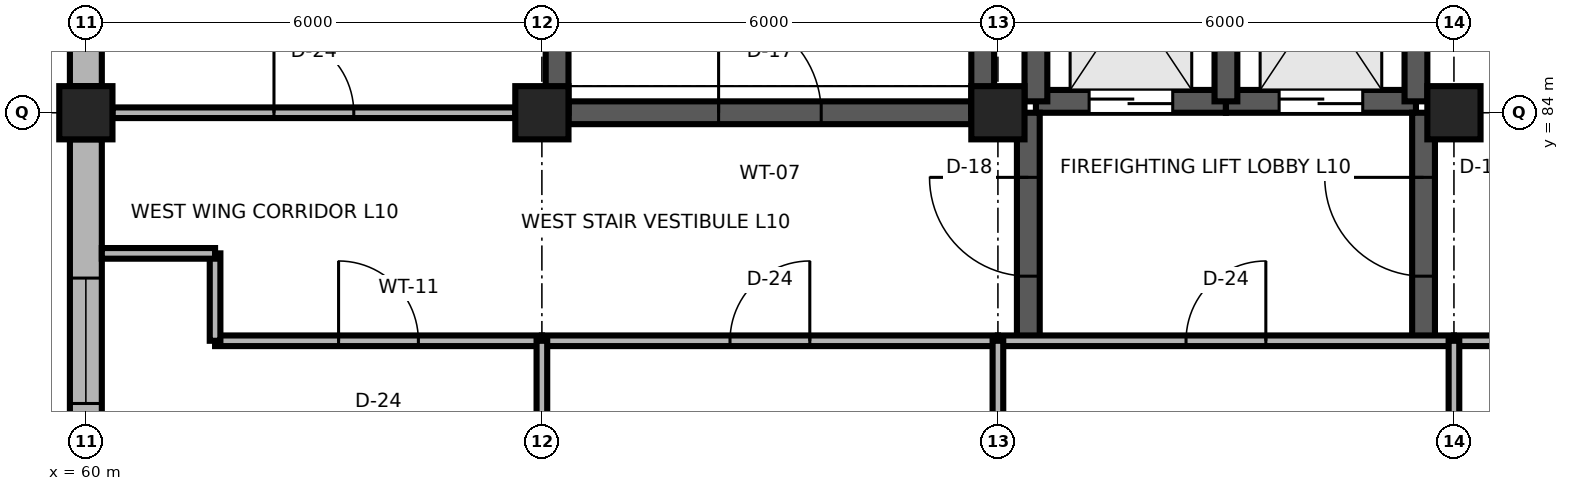
"""IFC4 building model, lengths in metres.
Left out: names, types, materials, properties, quantities, classifications, styles, units other than length and angle.
Written with IfcOpenShell. Run it as: python <this file> out.ifc"""

import sys

from ifc_helpers import new_model, si_unit, direction, frame, frame_2d, origin, origin_2d, place, context, subcontext, project, spatial, rectangle, extrude, element, fill, save


model = new_model("IFC4")
c1 = context("Model", 3, precision=1e-05, world=origin(), true_north=direction((0.0, 1.0)))
c2 = subcontext(c1, "Body", "Model", "MODEL_VIEW")
j1 = project(units=[si_unit("LENGTHUNIT", "METRE"), si_unit("PLANEANGLEUNIT", "RADIAN")], contexts=[c1])
p1 = place(None, origin())
s1 = spatial("IfcSite", under=j1, at=p1, CompositionType="ELEMENT")
p2 = place(p1, origin())
s2 = spatial("IfcBuilding", under=s1, at=p2, CompositionType="ELEMENT")
p3 = place(p2, frame((0.0, 0.0, 40.5)))
s3 = spatial("IfcBuildingStorey", under=s2, at=p3, CompositionType="ELEMENT", Elevation=40.5)
for number, where, z_axis, x_axis in (
    (1, (60.0, 84.0, 0.0), (0.0, 0.0, 1.0), (1.0, 0.0, 0.0)),
    (2, (66.0, 84.0, 0.0), (0.0, 0.0, 1.0), (1.0, 0.0, 0.0)),
    (3, (72.0, 84.0, 0.0), (0.0, 0.0, 1.0), (1.0, 0.0, 0.0)),
    (4, (78.0, 84.0, 0.0), (0.0, 0.0, 1.0), (1.0, 0.0, 0.0)),
):
    element("IfcColumn", number, at=place(p3, frame(where, z_axis=z_axis, x_axis=x_axis)), inside=s3, PredefinedType="COLUMN", context=c2, shape_type="SweptSolid", body=[
        extrude(rectangle(XDim=0.7, YDim=0.7, at=origin_2d()), origin(), (0.0, 0.0, 1.0), 3.9),
    ])
p4 = place(p3, frame((60.0, 78.35, 0.0), z_axis=(0.0, 0.0, 1.0), x_axis=(0.0, 1.0, 0.0)))
e5 = element("IfcWall", 5, at=p4, inside=s3, PredefinedType="SOLIDWALL", context=c2, shape_type="SweptSolid", body=[
    extrude(rectangle(XDim=5.3, YDim=0.42, at=frame_2d((2.65, 0.0))), origin(), (0.0, 0.0, 1.0), 3.32),
])
p5 = place(p4, frame((1.825, 0.0, 0.85)))
e6 = element("IfcOpeningElement", 6, at=p5, cuts=e5, PredefinedType="OPENING", context=c2, shape_type="SweptSolid", body=[
    extrude(rectangle(XDim=1.65, YDim=1.95, at=frame_2d((0.825, 0.975))), frame((0.0, 0.225, 0.0), z_axis=(0.0, -1.0, 0.0), x_axis=(1.0, 0.0, 0.0)), (0.0, 0.0, 1.0), 0.45),
])
p6 = place(p3, frame((60.0, 84.35, 0.0), z_axis=(0.0, 0.0, 1.0), x_axis=(0.0, 1.0, 0.0)))
e7 = element("IfcWall", 7, at=p6, inside=s3, PredefinedType="SOLIDWALL", context=c2, shape_type="SweptSolid", body=[
    extrude(rectangle(XDim=5.3, YDim=0.42, at=frame_2d((2.65, 0.0))), origin(), (0.0, 0.0, 1.0), 3.32),
])
p7 = place(p6, frame((1.825, 0.0, 0.85)))
e8 = element("IfcOpeningElement", 8, at=p7, cuts=e7, PredefinedType="OPENING", context=c2, shape_type="SweptSolid", body=[
    extrude(rectangle(XDim=1.65, YDim=1.95, at=frame_2d((0.825, 0.975))), frame((0.0, 0.225, 0.0), z_axis=(0.0, -1.0, 0.0), x_axis=(1.0, 0.0, 0.0)), (0.0, 0.0, 1.0), 0.45),
])
p8 = place(p3, frame((66.35, 84.0, 0.0), z_axis=(0.0, 0.0, 1.0), x_axis=(1.0, 0.0, 0.0)))
e9 = element("IfcWall", 9, at=p8, inside=s3, PredefinedType="SHEAR", context=c2, shape_type="SweptSolid", body=[
    extrude(rectangle(XDim=5.3, YDim=0.3, at=frame_2d((2.65, 0.0))), origin(), (0.0, 0.0, 1.0), 3.66),
])
p9 = place(p8, frame((1.975, 0.0, 0.0)))
e10 = element("IfcOpeningElement", 10, at=p9, cuts=e9, PredefinedType="OPENING", context=c2, shape_type="SweptSolid", body=[
    extrude(rectangle(XDim=1.35, YDim=2.2, at=frame_2d((0.675, 1.1))), frame((0.0, 0.165, 0.0), z_axis=(0.0, -1.0, 0.0), x_axis=(1.0, 0.0, 0.0)), (0.0, 0.0, 1.0), 0.33),
])
for number, where, z_axis, x_axis in (
    (11, (66.2, 84.0, 0.0), (0.0, 0.0, 1.0), (0.0, 1.0, 0.0)),
    (12, (71.8, 84.0, 0.0), (0.0, 0.0, 1.0), (0.0, 1.0, 0.0)),
):
    element("IfcWall", number, at=place(p3, frame(where, z_axis=z_axis, x_axis=x_axis)), inside=s3, PredefinedType="SHEAR", context=c2, shape_type="SweptSolid", body=[
        extrude(rectangle(XDim=11.8, YDim=0.3, at=frame_2d((5.9, 0.0))), origin(), (0.0, 0.0, 1.0), 3.74),
    ])
p10 = place(p3, frame((72.5, 84.15, 0.0), z_axis=(0.0, 0.0, 1.0), x_axis=(1.0, 0.0, 0.0)))
e13 = element("IfcWall", 13, at=p10, inside=s3, PredefinedType="SHEAR", context=c2, shape_type="SweptSolid", body=[
    extrude(rectangle(XDim=2.5, YDim=0.3, at=frame_2d((1.25, 0.0))), origin(), (0.0, 0.0, 1.0), 3.74),
])
p11 = place(p10, frame((0.7, 0.0, 0.0)))
e14 = element("IfcOpeningElement", 14, at=p11, cuts=e13, PredefinedType="OPENING", context=c2, shape_type="SweptSolid", body=[
    extrude(rectangle(XDim=1.1, YDim=2.1, at=frame_2d((0.55, 1.05))), frame((0.0, 0.165, 0.0), z_axis=(0.0, -1.0, 0.0), x_axis=(1.0, 0.0, 0.0)), (0.0, 0.0, 1.0), 0.33),
])
p12 = place(p3, frame((72.5, 84.15, 0.0), z_axis=(0.0, 0.0, 1.0), x_axis=(0.0, 1.0, 0.0)))
e15 = element("IfcWall", 15, at=p12, inside=s3, PredefinedType="SHEAR", context=c2, shape_type="SweptSolid", body=[
    extrude(rectangle(XDim=3.4, YDim=0.3, at=frame_2d((1.7, 0.0))), origin(), (0.0, 0.0, 1.0), 3.74),
])
p13 = place(p3, frame((75.0, 84.15, 0.0), z_axis=(0.0, 0.0, 1.0), x_axis=(1.0, 0.0, 0.0)))
e16 = element("IfcWall", 16, at=p13, inside=s3, PredefinedType="SHEAR", context=c2, shape_type="SweptSolid", body=[
    extrude(rectangle(XDim=2.5, YDim=0.3, at=frame_2d((1.25, 0.0))), origin(), (0.0, 0.0, 1.0), 3.74),
])
p14 = place(p13, frame((0.7, 0.0, 0.0)))
e17 = element("IfcOpeningElement", 17, at=p14, cuts=e16, PredefinedType="OPENING", context=c2, shape_type="SweptSolid", body=[
    extrude(rectangle(XDim=1.1, YDim=2.1, at=frame_2d((0.55, 1.05))), frame((0.0, 0.165, 0.0), z_axis=(0.0, -1.0, 0.0), x_axis=(1.0, 0.0, 0.0)), (0.0, 0.0, 1.0), 0.33),
])
for number, where, z_axis, x_axis in (
    (18, (75.0, 84.15, 0.0), (0.0, 0.0, 1.0), (0.0, 1.0, 0.0)),
    (19, (77.5, 84.15, 0.0), (0.0, 0.0, 1.0), (0.0, 1.0, 0.0)),
):
    element("IfcWall", number, at=place(p3, frame(where, z_axis=z_axis, x_axis=x_axis)), inside=s3, PredefinedType="SHEAR", context=c2, shape_type="SweptSolid", body=[
        extrude(rectangle(XDim=3.4, YDim=0.3, at=frame_2d((1.7, 0.0))), origin(), (0.0, 0.0, 1.0), 3.74),
    ])
p15 = place(p3, frame((72.4, 81.0, 0.0), z_axis=(0.0, 0.0, 1.0), x_axis=(0.0, 1.0, 0.0)))
e20 = element("IfcWall", 20, at=p15, inside=s3, PredefinedType="SHEAR", context=c2, shape_type="SweptSolid", body=[
    extrude(rectangle(XDim=3.0, YDim=0.3, at=frame_2d((1.5, 0.0))), origin(), (0.0, 0.0, 1.0), 3.74),
])
p16 = place(p15, frame((0.85, 0.0, 0.0)))
e21 = element("IfcOpeningElement", 21, at=p16, cuts=e20, PredefinedType="OPENING", context=c2, shape_type="SweptSolid", body=[
    extrude(rectangle(XDim=1.3, YDim=2.2, at=frame_2d((0.65, 1.1))), frame((0.0, 0.165, 0.0), z_axis=(0.0, -1.0, 0.0), x_axis=(1.0, 0.0, 0.0)), (0.0, 0.0, 1.0), 0.33),
])
p17 = place(p3, frame((77.6, 81.0, 0.0), z_axis=(0.0, 0.0, 1.0), x_axis=(0.0, 1.0, 0.0)))
e22 = element("IfcWall", 22, at=p17, inside=s3, PredefinedType="SHEAR", context=c2, shape_type="SweptSolid", body=[
    extrude(rectangle(XDim=3.0, YDim=0.3, at=frame_2d((1.5, 0.0))), origin(), (0.0, 0.0, 1.0), 3.74),
])
p18 = place(p17, frame((0.85, 0.0, 0.0)))
e23 = element("IfcOpeningElement", 23, at=p18, cuts=e22, PredefinedType="OPENING", context=c2, shape_type="SweptSolid", body=[
    extrude(rectangle(XDim=1.3, YDim=2.2, at=frame_2d((0.65, 1.1))), frame((0.0, 0.165, 0.0), z_axis=(0.0, -1.0, 0.0), x_axis=(1.0, 0.0, 0.0)), (0.0, 0.0, 1.0), 0.33),
])
p19 = place(p3, frame((61.7, 81.0, 0.0), z_axis=(0.0, 0.0, 1.0), x_axis=(1.0, 0.0, 0.0)))
e24 = element("IfcWall", 24, at=p19, inside=s3, PredefinedType="PARTITIONING", context=c2, shape_type="SweptSolid", body=[
    extrude(rectangle(XDim=4.3, YDim=0.14, at=frame_2d((2.15, 0.0))), origin(), (0.0, 0.0, 1.0), 3.74),
])
p20 = place(p19, frame((1.625, 0.0, 0.0)))
e25 = element("IfcOpeningElement", 25, at=p20, cuts=e24, PredefinedType="OPENING", context=c2, shape_type="SweptSolid", body=[
    extrude(rectangle(XDim=1.05, YDim=2.25, at=frame_2d((0.525, 1.125))), frame((0.0, 0.085, 0.0), z_axis=(0.0, -1.0, 0.0), x_axis=(1.0, 0.0, 0.0)), (0.0, 0.0, 1.0), 0.17),
])
p21 = place(p3, frame((66.0, 81.0, 0.0), z_axis=(0.0, 0.0, 1.0), x_axis=(1.0, 0.0, 0.0)))
e26 = element("IfcWall", 26, at=p21, inside=s3, PredefinedType="PARTITIONING", context=c2, shape_type="SweptSolid", body=[
    extrude(rectangle(XDim=6.0, YDim=0.14, at=frame_2d((3.0, 0.0))), origin(), (0.0, 0.0, 1.0), 3.74),
])
p22 = place(p21, frame((2.475, 0.0, 0.0)))
e27 = element("IfcOpeningElement", 27, at=p22, cuts=e26, PredefinedType="OPENING", context=c2, shape_type="SweptSolid", body=[
    extrude(rectangle(XDim=1.05, YDim=2.25, at=frame_2d((0.525, 1.125))), frame((0.0, 0.085, 0.0), z_axis=(0.0, -1.0, 0.0), x_axis=(1.0, 0.0, 0.0)), (0.0, 0.0, 1.0), 0.17),
])
p23 = place(p3, frame((72.0, 81.0, 0.0), z_axis=(0.0, 0.0, 1.0), x_axis=(1.0, 0.0, 0.0)))
e28 = element("IfcWall", 28, at=p23, inside=s3, PredefinedType="PARTITIONING", context=c2, shape_type="SweptSolid", body=[
    extrude(rectangle(XDim=6.0, YDim=0.14, at=frame_2d((3.0, 0.0))), origin(), (0.0, 0.0, 1.0), 3.74),
])
p24 = place(p23, frame((2.475, 0.0, 0.0)))
e29 = element("IfcOpeningElement", 29, at=p24, cuts=e28, PredefinedType="OPENING", context=c2, shape_type="SweptSolid", body=[
    extrude(rectangle(XDim=1.05, YDim=2.25, at=frame_2d((0.525, 1.125))), frame((0.0, 0.085, 0.0), z_axis=(0.0, -1.0, 0.0), x_axis=(1.0, 0.0, 0.0)), (0.0, 0.0, 1.0), 0.17),
])
p25 = place(p3, frame((78.0, 81.0, 0.0), z_axis=(0.0, 0.0, 1.0), x_axis=(1.0, 0.0, 0.0)))
e30 = element("IfcWall", 30, at=p25, inside=s3, PredefinedType="PARTITIONING", context=c2, shape_type="SweptSolid", body=[
    extrude(rectangle(XDim=6.0, YDim=0.14, at=frame_2d((3.0, 0.0))), origin(), (0.0, 0.0, 1.0), 3.74),
])
p26 = place(p25, frame((2.475, 0.0, 0.0)))
e31 = element("IfcOpeningElement", 31, at=p26, cuts=e30, PredefinedType="OPENING", context=c2, shape_type="SweptSolid", body=[
    extrude(rectangle(XDim=1.05, YDim=2.25, at=frame_2d((0.525, 1.125))), frame((0.0, 0.085, 0.0), z_axis=(0.0, -1.0, 0.0), x_axis=(1.0, 0.0, 0.0)), (0.0, 0.0, 1.0), 0.17),
])
p27 = place(p3, frame((60.35, 84.0, 0.0), z_axis=(0.0, 0.0, 1.0), x_axis=(1.0, 0.0, 0.0)))
e32 = element("IfcWall", 32, at=p27, inside=s3, PredefinedType="PARTITIONING", context=c2, shape_type="SweptSolid", body=[
    extrude(rectangle(XDim=5.3, YDim=0.14, at=frame_2d((2.65, 0.0))), origin(), (0.0, 0.0, 1.0), 3.348),
])
p28 = place(p27, frame((2.125, 0.0, 0.0)))
e33 = element("IfcOpeningElement", 33, at=p28, cuts=e32, PredefinedType="OPENING", context=c2, shape_type="SweptSolid", body=[
    extrude(rectangle(XDim=1.05, YDim=2.25, at=frame_2d((0.525, 1.125))), frame((0.0, 0.085, 0.0), z_axis=(0.0, -1.0, 0.0), x_axis=(1.0, 0.0, 0.0)), (0.0, 0.0, 1.0), 0.17),
])
for number, where, z_axis, x_axis in (
    (34, (66.0, 72.65, 0.0), (0.0, 0.0, 1.0), (0.0, 1.0, 0.0)),
    (35, (72.0, 72.65, 0.0), (0.0, 0.0, 1.0), (0.0, 1.0, 0.0)),
    (36, (78.0, 72.65, 0.0), (0.0, 0.0, 1.0), (0.0, 1.0, 0.0)),
):
    element("IfcWall", number, at=place(p3, frame(where, z_axis=z_axis, x_axis=x_axis)), inside=s3, PredefinedType="PARTITIONING", context=c2, shape_type="SweptSolid", body=[
        extrude(rectangle(XDim=8.35, YDim=0.14, at=frame_2d((4.175, 0.0))), origin(), (0.0, 0.0, 1.0), 3.348),
    ])
p29 = place(p3, frame((61.7, 81.0, 0.0), z_axis=(0.0, 0.0, 1.0), x_axis=(0.0, 1.0, 0.0)))
e37 = element("IfcWall", 37, at=p29, inside=s3, PredefinedType="PARTITIONING", context=c2, shape_type="SweptSolid", body=[
    extrude(rectangle(XDim=1.15, YDim=0.14, at=frame_2d((0.575, 0.0))), origin(), (0.0, 0.0, 1.0), 3.74),
])
p30 = place(p3, frame((61.7, 82.15, 0.0), z_axis=(0.0, 0.0, 1.0), x_axis=(-1.0, 0.0, 0.0)))
e38 = element("IfcWall", 38, at=p30, inside=s3, PredefinedType="PARTITIONING", context=c2, shape_type="SweptSolid", body=[
    extrude(rectangle(XDim=1.49, YDim=0.14, at=frame_2d((0.745, 0.0))), origin(), (0.0, 0.0, 1.0), 3.74),
])
p31 = place(p5, origin())
e39 = element("IfcWindow", 39, at=p31, inside=s3, PartitioningType="SINGLE_PANEL", PredefinedType="WINDOW", context=c2, shape_type="SweptSolid", body=[
    extrude(rectangle(XDim=1.65, YDim=1.95, at=frame_2d((0.825, 0.975))), frame((0.0, 0.03, 0.0), z_axis=(0.0, -1.0, 0.0), x_axis=(1.0, 0.0, 0.0)), (0.0, 0.0, 1.0), 0.06),
])
fill(e6, e39)
p32 = place(p9, origin())
e40 = element("IfcDoor", 40, at=p32, inside=s3, OperationType="SINGLE_SWING_LEFT", PredefinedType="DOOR", context=c2, shape_type="SweptSolid", body=[
    extrude(rectangle(XDim=1.35, YDim=2.2, at=frame_2d((0.675, 1.1))), frame((0.0, 0.025, 0.0), z_axis=(0.0, -1.0, 0.0), x_axis=(1.0, 0.0, 0.0)), (0.0, 0.0, 1.0), 0.05),
])
fill(e10, e40)
p33 = place(p11, origin())
e41 = element("IfcDoor", 41, at=p33, inside=s3, OperationType="DOUBLE_DOOR_SLIDING", PredefinedType="DOOR", context=c2, shape_type="SweptSolid", body=[
    extrude(rectangle(XDim=1.1, YDim=2.1, at=frame_2d((0.55, 1.05))), frame((0.0, 0.025, 0.0), z_axis=(0.0, -1.0, 0.0), x_axis=(1.0, 0.0, 0.0)), (0.0, 0.0, 1.0), 0.05),
])
fill(e14, e41)
p34 = place(p14, origin())
e42 = element("IfcDoor", 42, at=p34, inside=s3, OperationType="DOUBLE_DOOR_SLIDING", PredefinedType="DOOR", context=c2, shape_type="SweptSolid", body=[
    extrude(rectangle(XDim=1.1, YDim=2.1, at=frame_2d((0.55, 1.05))), frame((0.0, 0.025, 0.0), z_axis=(0.0, -1.0, 0.0), x_axis=(1.0, 0.0, 0.0)), (0.0, 0.0, 1.0), 0.05),
])
fill(e17, e42)
p35 = place(p16, origin())
e43 = element("IfcDoor", 43, at=p35, inside=s3, OperationType="SINGLE_SWING_RIGHT", PredefinedType="DOOR", context=c2, shape_type="SweptSolid", body=[
    extrude(rectangle(XDim=1.3, YDim=2.2, at=frame_2d((0.65, 1.1))), frame((0.0, 0.025, 0.0), z_axis=(0.0, -1.0, 0.0), x_axis=(1.0, 0.0, 0.0)), (0.0, 0.0, 1.0), 0.05),
])
fill(e21, e43)
p36 = place(p18, origin())
e44 = element("IfcDoor", 44, at=p36, inside=s3, OperationType="SINGLE_SWING_RIGHT", PredefinedType="DOOR", context=c2, shape_type="SweptSolid", body=[
    extrude(rectangle(XDim=1.3, YDim=2.2, at=frame_2d((0.65, 1.1))), frame((0.0, 0.025, 0.0), z_axis=(0.0, -1.0, 0.0), x_axis=(1.0, 0.0, 0.0)), (0.0, 0.0, 1.0), 0.05),
])
fill(e23, e44)
p37 = place(p20, origin())
e45 = element("IfcDoor", 45, at=p37, inside=s3, OperationType="SINGLE_SWING_LEFT", PredefinedType="DOOR", context=c2, shape_type="SweptSolid", body=[
    extrude(rectangle(XDim=1.05, YDim=2.25, at=frame_2d((0.525, 1.125))), frame((0.0, 0.025, 0.0), z_axis=(0.0, -1.0, 0.0), x_axis=(1.0, 0.0, 0.0)), (0.0, 0.0, 1.0), 0.05),
])
fill(e25, e45)
p38 = place(p22, origin())
e46 = element("IfcDoor", 46, at=p38, inside=s3, OperationType="SINGLE_SWING_RIGHT", PredefinedType="DOOR", context=c2, shape_type="SweptSolid", body=[
    extrude(rectangle(XDim=1.05, YDim=2.25, at=frame_2d((0.525, 1.125))), frame((0.0, 0.025, 0.0), z_axis=(0.0, -1.0, 0.0), x_axis=(1.0, 0.0, 0.0)), (0.0, 0.0, 1.0), 0.05),
])
fill(e27, e46)
p39 = place(p24, origin())
e47 = element("IfcDoor", 47, at=p39, inside=s3, OperationType="SINGLE_SWING_RIGHT", PredefinedType="DOOR", context=c2, shape_type="SweptSolid", body=[
    extrude(rectangle(XDim=1.05, YDim=2.25, at=frame_2d((0.525, 1.125))), frame((0.0, 0.025, 0.0), z_axis=(0.0, -1.0, 0.0), x_axis=(1.0, 0.0, 0.0)), (0.0, 0.0, 1.0), 0.05),
])
fill(e29, e47)
p40 = place(p28, origin())
e48 = element("IfcDoor", 48, at=p40, inside=s3, OperationType="SINGLE_SWING_LEFT", PredefinedType="DOOR", context=c2, shape_type="SweptSolid", body=[
    extrude(rectangle(XDim=1.05, YDim=2.25, at=frame_2d((0.525, 1.125))), frame((0.0, 0.025, 0.0), z_axis=(0.0, -1.0, 0.0), x_axis=(1.0, 0.0, 0.0)), (0.0, 0.0, 1.0), 0.05),
])
fill(e33, e48)
save(model, sys.argv[1])
